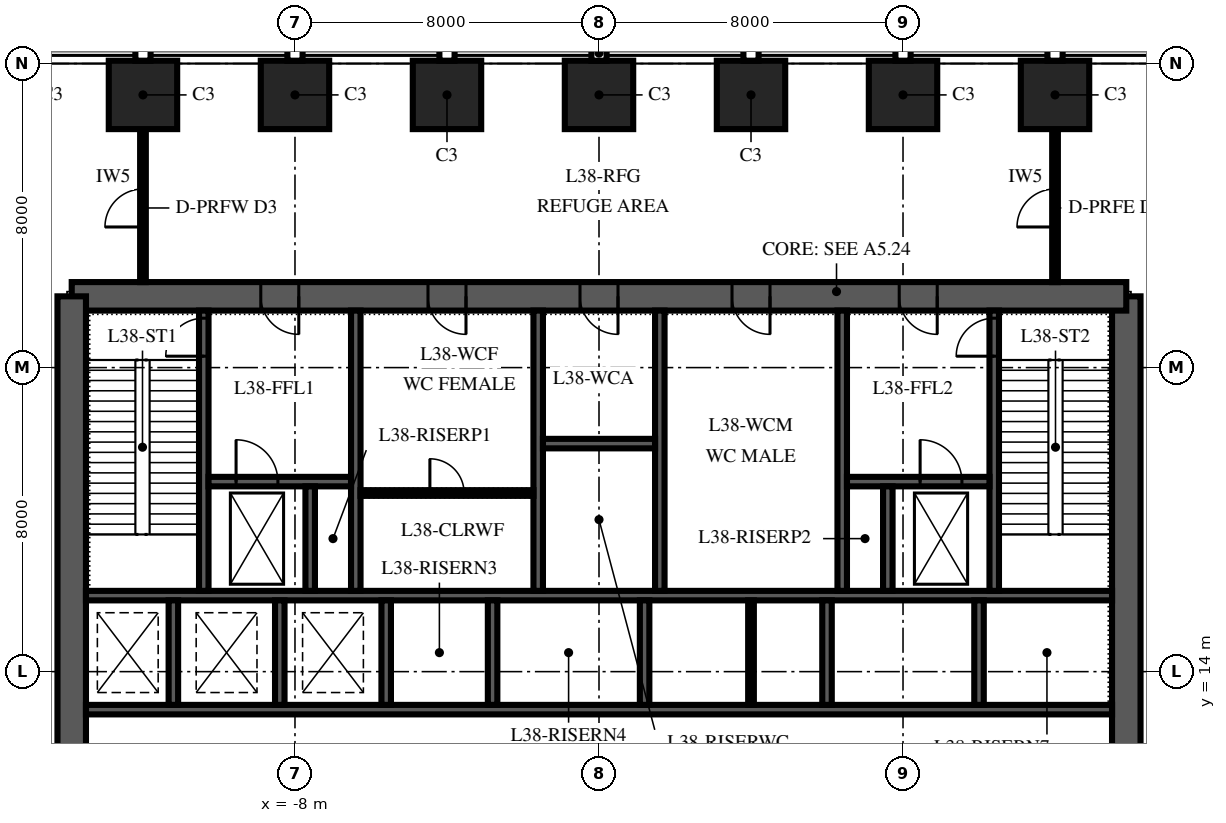
"""IFC4 building model, lengths in metres.
Left out: names, types, materials, properties, quantities, classifications, styles, units other than length and angle.
Written with IfcOpenShell. Run it as: python <this file> out.ifc"""

import sys

from ifc_helpers import new_model, si_unit, direction, frame, frame_2d, origin, origin_2d, place, context, subcontext, project, spatial, polyline, rectangle, outline, extrude, element, fill, save


model = new_model("IFC4")
c1 = context("Model", 3, precision=1e-05, world=origin(), true_north=direction((0.0, 1.0)))
c2 = subcontext(c1, "Body", "Model", "MODEL_VIEW")
j1 = project(units=[si_unit("LENGTHUNIT", "METRE"), si_unit("PLANEANGLEUNIT", "RADIAN")], contexts=[c1])
p1 = place(None, origin())
s1 = spatial("IfcSite", under=j1, at=p1, CompositionType="ELEMENT")
p2 = place(p1, origin())
s2 = spatial("IfcBuilding", under=s1, at=p2, CompositionType="ELEMENT")
p3 = place(p2, frame((0.0, 0.0, 167.0)))
s3 = spatial("IfcBuildingStorey", under=s2, at=p3, CompositionType="ELEMENT", Elevation=167.0)
for number, where, z_axis, x_axis in (
    (1, (12.0, 29.175, 0.0), (0.0, 0.0, 1.0), (-1.0, 0.0, 0.0)),
    (2, (8.0, 29.175, 0.0), (0.0, 0.0, 1.0), (-1.0, 0.0, 0.0)),
    (3, (4.0, 29.175, 0.0), (0.0, 0.0, 1.0), (-1.0, 0.0, 0.0)),
    (4, (0.0, 29.175, 0.0), (0.0, 0.0, 1.0), (-1.0, 0.0, 0.0)),
    (5, (-4.0, 29.175, 0.0), (0.0, 0.0, 1.0), (-1.0, 0.0, 0.0)),
    (6, (-8.0, 29.175, 0.0), (0.0, 0.0, 1.0), (-1.0, 0.0, 0.0)),
    (7, (-12.0, 29.175, 0.0), (0.0, 0.0, 1.0), (-1.0, 0.0, 0.0)),
):
    element("IfcColumn", number, at=place(p3, frame(where, z_axis=z_axis, x_axis=x_axis)), inside=s3, PredefinedType="COLUMN", context=c2, shape_type="SweptSolid", body=[
        extrude(rectangle(XDim=1.8, YDim=1.8, at=origin_2d()), origin(), (0.0, 0.0, 1.0), 6.0),
    ])
p4 = place(p3, frame((13.875, 6.125, 0.0), z_axis=(0.0, 0.0, 1.0), x_axis=(0.0, 1.0, 0.0)))
e8 = element("IfcWall", 8, at=p4, inside=s3, PredefinedType="SHEAR", context=c2, shape_type="SweptSolid", body=[
    extrude(outline(polyline([(0.0, -0.375), (17.75, -0.375), (17.75, 0.0), (17.375, 0.0), (17.375, 0.375), (0.375, 0.375), (0.375, 0.0), (0.0, 0.0), (0.0, -0.375)])), origin(), (0.0, 0.0, 1.0), 6.0),
])
p5 = place(p3, frame((13.875, 23.875, 0.0), z_axis=(0.0, 0.0, 1.0), x_axis=(-1.0, 0.0, 0.0)))
e9 = element("IfcWall", 9, at=p5, inside=s3, PredefinedType="SHEAR", context=c2, shape_type="SweptSolid", body=[
    extrude(rectangle(XDim=27.75, YDim=0.75, at=frame_2d((13.875, 0.0))), origin(), (0.0, 0.0, 1.0), 6.0),
])
p6 = place(p5, frame((21.775, 0.0, 0.0)))
e10 = element("IfcOpeningElement", 10, at=p6, cuts=e9, PredefinedType="OPENING", context=c2, shape_type="SweptSolid", body=[
    extrude(rectangle(XDim=1.0, YDim=2.1, at=frame_2d((0.5, 1.05))), frame((0.0, 0.39, 0.0), z_axis=(0.0, -1.0, 0.0), x_axis=(1.0, 0.0, 0.0)), (0.0, 0.0, 1.0), 0.78),
])
p7 = place(p5, frame((4.975, 0.0, 0.0)))
e11 = element("IfcOpeningElement", 11, at=p7, cuts=e9, PredefinedType="OPENING", context=c2, shape_type="SweptSolid", body=[
    extrude(rectangle(XDim=1.0, YDim=2.1, at=frame_2d((0.5, 1.05))), frame((0.0, 0.39, 0.0), z_axis=(0.0, -1.0, 0.0), x_axis=(1.0, 0.0, 0.0)), (0.0, 0.0, 1.0), 0.78),
])
p8 = place(p5, frame((17.375, 0.0, 0.0)))
e12 = element("IfcOpeningElement", 12, at=p8, cuts=e9, PredefinedType="OPENING", context=c2, shape_type="SweptSolid", body=[
    extrude(rectangle(XDim=1.0, YDim=2.1, at=frame_2d((0.5, 1.05))), frame((0.0, 0.39, 0.0), z_axis=(0.0, -1.0, 0.0), x_axis=(1.0, 0.0, 0.0)), (0.0, 0.0, 1.0), 0.78),
])
p9 = place(p5, frame((13.375, 0.0, 0.0)))
e13 = element("IfcOpeningElement", 13, at=p9, cuts=e9, PredefinedType="OPENING", context=c2, shape_type="SweptSolid", body=[
    extrude(rectangle(XDim=1.0, YDim=2.1, at=frame_2d((0.5, 1.05))), frame((0.0, 0.39, 0.0), z_axis=(0.0, -1.0, 0.0), x_axis=(1.0, 0.0, 0.0)), (0.0, 0.0, 1.0), 0.78),
])
p10 = place(p5, frame((9.375, 0.0, 0.0)))
e14 = element("IfcOpeningElement", 14, at=p10, cuts=e9, PredefinedType="OPENING", context=c2, shape_type="SweptSolid", body=[
    extrude(rectangle(XDim=1.0, YDim=2.1, at=frame_2d((0.5, 1.05))), frame((0.0, 0.39, 0.0), z_axis=(0.0, -1.0, 0.0), x_axis=(1.0, 0.0, 0.0)), (0.0, 0.0, 1.0), 0.78),
])
p11 = place(p3, frame((-13.875, 23.875, 0.0), z_axis=(0.0, 0.0, 1.0), x_axis=(0.0, -1.0, 0.0)))
e15 = element("IfcWall", 15, at=p11, inside=s3, PredefinedType="SHEAR", context=c2, shape_type="SweptSolid", body=[
    extrude(outline(polyline([(0.0, -0.375), (17.75, -0.375), (17.75, 0.0), (17.375, 0.0), (17.375, 0.375), (0.375, 0.375), (0.375, 0.0), (0.0, 0.0), (0.0, -0.375)])), origin(), (0.0, 0.0, 1.0), 6.0),
])
for number, where, z_axis, x_axis in (
    (16, (-13.5, 13.0, 0.0), (0.0, 0.0, 1.0), (1.0, 0.0, 0.0)),
    (17, (-13.5, 16.0, 0.0), (0.0, 0.0, 1.0), (1.0, 0.0, 0.0)),
):
    element("IfcWall", number, at=place(p3, frame(where, z_axis=z_axis, x_axis=x_axis)), inside=s3, PredefinedType="SHEAR", context=c2, shape_type="SweptSolid", body=[
        extrude(rectangle(XDim=27.0, YDim=0.25, at=frame_2d((13.5, 0.0))), origin(), (0.0, 0.0, 1.0), 6.0),
    ])
for number, where, z_axis, x_axis in (
    (18, (-11.2, 13.125, 0.0), (0.0, 0.0, 1.0), (0.0, 1.0, 0.0)),
    (19, (-8.4, 13.125, 0.0), (0.0, 0.0, 1.0), (0.0, 1.0, 0.0)),
    (20, (-5.6, 13.125, 0.0), (0.0, 0.0, 1.0), (0.0, 1.0, 0.0)),
    (21, (-2.8, 13.125, 0.0), (0.0, 0.0, 1.0), (0.0, 1.0, 0.0)),
    (22, (1.2, 13.125, 0.0), (0.0, 0.0, 1.0), (0.0, 1.0, 0.0)),
    (23, (6.0, 13.125, 0.0), (0.0, 0.0, 1.0), (0.0, 1.0, 0.0)),
    (24, (10.0, 13.125, 0.0), (0.0, 0.0, 1.0), (0.0, 1.0, 0.0)),
):
    element("IfcWall", number, at=place(p3, frame(where, z_axis=z_axis, x_axis=x_axis)), inside=s3, PredefinedType="SHEAR", context=c2, shape_type="SweptSolid", body=[
        extrude(rectangle(XDim=2.75, YDim=0.25, at=frame_2d((1.375, 0.0))), origin(), (0.0, 0.0, 1.0), 6.0),
    ])
p12 = place(p3, frame((-10.4, 16.125, 0.0), z_axis=(0.0, 0.0, 1.0), x_axis=(0.0, 1.0, 0.0)))
e25 = element("IfcWall", 25, at=p12, inside=s3, PredefinedType="SHEAR", context=c2, shape_type="SweptSolid", body=[
    extrude(rectangle(XDim=7.375, YDim=0.25, at=frame_2d((3.688, 0.0))), origin(), (0.0, 0.0, 1.0), 6.0),
])
p13 = place(p12, frame((6.175, 0.0, 0.0)))
e26 = element("IfcOpeningElement", 26, at=p13, cuts=e25, PredefinedType="OPENING", context=c2, shape_type="SweptSolid", body=[
    extrude(rectangle(XDim=1.0, YDim=2.1, at=frame_2d((0.5, 1.05))), frame((0.0, 0.14, 0.0), z_axis=(0.0, -1.0, 0.0), x_axis=(1.0, 0.0, 0.0)), (0.0, 0.0, 1.0), 0.28),
])
for number, where, z_axis, x_axis in (
    (27, (-6.4, 16.125, 0.0), (0.0, 0.0, 1.0), (0.0, 1.0, 0.0)),
    (28, (-1.6, 16.125, 0.0), (0.0, 0.0, 1.0), (0.0, 1.0, 0.0)),
    (29, (1.6, 16.125, 0.0), (0.0, 0.0, 1.0), (0.0, 1.0, 0.0)),
    (30, (6.4, 16.125, 0.0), (0.0, 0.0, 1.0), (0.0, 1.0, 0.0)),
):
    element("IfcWall", number, at=place(p3, frame(where, z_axis=z_axis, x_axis=x_axis)), inside=s3, PredefinedType="SHEAR", context=c2, shape_type="SweptSolid", body=[
        extrude(rectangle(XDim=7.375, YDim=0.25, at=frame_2d((3.688, 0.0))), origin(), (0.0, 0.0, 1.0), 6.0),
    ])
p14 = place(p3, frame((10.4, 16.125, 0.0), z_axis=(0.0, 0.0, 1.0), x_axis=(0.0, 1.0, 0.0)))
e31 = element("IfcWall", 31, at=p14, inside=s3, PredefinedType="SHEAR", context=c2, shape_type="SweptSolid", body=[
    extrude(rectangle(XDim=7.375, YDim=0.25, at=frame_2d((3.688, 0.0))), origin(), (0.0, 0.0, 1.0), 6.0),
])
p15 = place(p14, frame((6.175, 0.0, 0.0)))
e32 = element("IfcOpeningElement", 32, at=p15, cuts=e31, PredefinedType="OPENING", context=c2, shape_type="SweptSolid", body=[
    extrude(rectangle(XDim=1.0, YDim=2.1, at=frame_2d((0.5, 1.05))), frame((0.0, 0.14, 0.0), z_axis=(0.0, -1.0, 0.0), x_axis=(1.0, 0.0, 0.0)), (0.0, 0.0, 1.0), 0.28),
])
p16 = place(p3, frame((-10.275, 19.0, 0.0), z_axis=(0.0, 0.0, 1.0), x_axis=(1.0, 0.0, 0.0)))
e33 = element("IfcWall", 33, at=p16, inside=s3, PredefinedType="SHEAR", context=c2, shape_type="SweptSolid", body=[
    extrude(rectangle(XDim=3.75, YDim=0.25, at=frame_2d((1.875, 0.0))), origin(), (0.0, 0.0, 1.0), 6.0),
])
p17 = place(p16, frame((0.725, 0.0, 0.0)))
e34 = element("IfcOpeningElement", 34, at=p17, cuts=e33, PredefinedType="OPENING", context=c2, shape_type="SweptSolid", body=[
    extrude(rectangle(XDim=1.1, YDim=2.1, at=frame_2d((0.55, 1.05))), frame((0.0, 0.14, 0.0), z_axis=(0.0, -1.0, 0.0), x_axis=(1.0, 0.0, 0.0)), (0.0, 0.0, 1.0), 0.28),
])
p18 = place(p3, frame((6.525, 19.0, 0.0), z_axis=(0.0, 0.0, 1.0), x_axis=(1.0, 0.0, 0.0)))
e35 = element("IfcWall", 35, at=p18, inside=s3, PredefinedType="SHEAR", context=c2, shape_type="SweptSolid", body=[
    extrude(rectangle(XDim=3.75, YDim=0.25, at=frame_2d((1.875, 0.0))), origin(), (0.0, 0.0, 1.0), 6.0),
])
p19 = place(p18, frame((1.925, 0.0, 0.0)))
e36 = element("IfcOpeningElement", 36, at=p19, cuts=e35, PredefinedType="OPENING", context=c2, shape_type="SweptSolid", body=[
    extrude(rectangle(XDim=1.1, YDim=2.1, at=frame_2d((0.55, 1.05))), frame((0.0, 0.14, 0.0), z_axis=(0.0, -1.0, 0.0), x_axis=(1.0, 0.0, 0.0)), (0.0, 0.0, 1.0), 0.28),
])
for number, where, z_axis, x_axis in (
    (37, (-7.6, 16.125, 0.0), (0.0, 0.0, 1.0), (0.0, 1.0, 0.0)),
    (38, (7.6, 16.125, 0.0), (0.0, 0.0, 1.0), (0.0, 1.0, 0.0)),
):
    element("IfcWall", number, at=place(p3, frame(where, z_axis=z_axis, x_axis=x_axis)), inside=s3, PredefinedType="SHEAR", context=c2, shape_type="SweptSolid", body=[
        extrude(rectangle(XDim=2.75, YDim=0.25, at=frame_2d((1.375, 0.0))), origin(), (0.0, 0.0, 1.0), 6.0),
    ])
p20 = place(p3, frame((-1.475, 20.0, 0.0), z_axis=(0.0, 0.0, 1.0), x_axis=(1.0, 0.0, 0.0)))
e39 = element("IfcWall", 39, at=p20, inside=s3, PredefinedType="SHEAR", context=c2, shape_type="SweptSolid", body=[
    extrude(rectangle(XDim=2.95, YDim=0.25, at=frame_2d((1.475, 0.0))), origin(), (0.0, 0.0, 1.0), 6.0),
])
p21 = place(p3, frame((-6.275, 18.7, 0.0), z_axis=(0.0, 0.0, 1.0), x_axis=(1.0, 0.0, 0.0)))
e40 = element("IfcWall", 40, at=p21, inside=s3, PredefinedType="PARTITIONING", context=c2, shape_type="SweptSolid", body=[
    extrude(rectangle(XDim=4.55, YDim=0.15, at=frame_2d((2.275, 0.0))), origin(), (0.0, 0.0, 1.0), 5.85),
])
p22 = place(p21, frame((1.825, 0.0, 0.0)))
e41 = element("IfcOpeningElement", 41, at=p22, cuts=e40, PredefinedType="OPENING", context=c2, shape_type="SweptSolid", body=[
    extrude(rectangle(XDim=0.9, YDim=2.1, at=frame_2d((0.45, 1.05))), frame((0.0, 0.09, 0.0), z_axis=(0.0, -1.0, 0.0), x_axis=(1.0, 0.0, 0.0)), (0.0, 0.0, 1.0), 0.18),
])
p23 = place(p3, frame((4.0, 13.125, 0.0), z_axis=(0.0, 0.0, 1.0), x_axis=(0.0, 1.0, 0.0)))
e42 = element("IfcWall", 42, at=p23, inside=s3, PredefinedType="PARTITIONING", context=c2, shape_type="SweptSolid", body=[
    extrude(rectangle(XDim=2.75, YDim=0.15, at=frame_2d((1.375, 0.0))), origin(), (0.0, 0.0, 1.0), 5.85),
])
p24 = place(p3, frame((12.0, 24.25, 0.0), z_axis=(0.0, 0.0, 1.0), x_axis=(0.0, 1.0, 0.0)))
e43 = element("IfcWall", 43, at=p24, inside=s3, PredefinedType="PARTITIONING", context=c2, shape_type="SweptSolid", body=[
    extrude(rectangle(XDim=3.97, YDim=0.15, at=frame_2d((1.985, 0.0))), origin(), (0.0, 0.0, 1.0), 5.8),
])
p25 = place(p24, frame((1.45, 0.0, 0.0)))
e44 = element("IfcOpeningElement", 44, at=p25, cuts=e43, PredefinedType="OPENING", context=c2, shape_type="SweptSolid", body=[
    extrude(rectangle(XDim=1.0, YDim=2.1, at=frame_2d((0.5, 1.05))), frame((0.0, 0.09, 0.0), z_axis=(0.0, -1.0, 0.0), x_axis=(1.0, 0.0, 0.0)), (0.0, 0.0, 1.0), 0.18),
])
p26 = place(p3, frame((-12.0, 24.25, 0.0), z_axis=(0.0, 0.0, 1.0), x_axis=(0.0, 1.0, 0.0)))
e45 = element("IfcWall", 45, at=p26, inside=s3, PredefinedType="PARTITIONING", context=c2, shape_type="SweptSolid", body=[
    extrude(rectangle(XDim=3.97, YDim=0.15, at=frame_2d((1.985, 0.0))), origin(), (0.0, 0.0, 1.0), 5.8),
])
p27 = place(p26, frame((1.45, 0.0, 0.0)))
e46 = element("IfcOpeningElement", 46, at=p27, cuts=e45, PredefinedType="OPENING", context=c2, shape_type="SweptSolid", body=[
    extrude(rectangle(XDim=1.0, YDim=2.1, at=frame_2d((0.5, 1.05))), frame((0.0, 0.09, 0.0), z_axis=(0.0, -1.0, 0.0), x_axis=(1.0, 0.0, 0.0)), (0.0, 0.0, 1.0), 0.18),
])
p28 = place(p6, origin())
e47 = element("IfcDoor", 47, at=p28, inside=s3, OperationType="SINGLE_SWING_RIGHT", PredefinedType="DOOR", context=c2, shape_type="SweptSolid", body=[
    extrude(rectangle(XDim=1.0, YDim=2.1, at=frame_2d((0.5, 1.05))), frame((0.0, 0.375, 0.0), z_axis=(0.0, -1.0, 0.0), x_axis=(1.0, 0.0, 0.0)), (0.0, 0.0, 1.0), 0.75),
])
fill(e10, e47)
p29 = place(p7, origin())
e48 = element("IfcDoor", 48, at=p29, inside=s3, OperationType="SINGLE_SWING_RIGHT", PredefinedType="DOOR", context=c2, shape_type="SweptSolid", body=[
    extrude(rectangle(XDim=1.0, YDim=2.1, at=frame_2d((0.5, 1.05))), frame((0.0, 0.375, 0.0), z_axis=(0.0, -1.0, 0.0), x_axis=(1.0, 0.0, 0.0)), (0.0, 0.0, 1.0), 0.75),
])
fill(e11, e48)
p30 = place(p8, origin())
e49 = element("IfcDoor", 49, at=p30, inside=s3, OperationType="SINGLE_SWING_LEFT", PredefinedType="DOOR", context=c2, shape_type="SweptSolid", body=[
    extrude(rectangle(XDim=1.0, YDim=2.1, at=frame_2d((0.5, 1.05))), frame((0.0, 0.375, 0.0), z_axis=(0.0, -1.0, 0.0), x_axis=(1.0, 0.0, 0.0)), (0.0, 0.0, 1.0), 0.75),
])
fill(e12, e49)
p31 = place(p9, origin())
e50 = element("IfcDoor", 50, at=p31, inside=s3, OperationType="SINGLE_SWING_LEFT", PredefinedType="DOOR", context=c2, shape_type="SweptSolid", body=[
    extrude(rectangle(XDim=1.0, YDim=2.1, at=frame_2d((0.5, 1.05))), frame((0.0, 0.375, 0.0), z_axis=(0.0, -1.0, 0.0), x_axis=(1.0, 0.0, 0.0)), (0.0, 0.0, 1.0), 0.75),
])
fill(e13, e50)
p32 = place(p10, origin())
e51 = element("IfcDoor", 51, at=p32, inside=s3, OperationType="SINGLE_SWING_LEFT", PredefinedType="DOOR", context=c2, shape_type="SweptSolid", body=[
    extrude(rectangle(XDim=1.0, YDim=2.1, at=frame_2d((0.5, 1.05))), frame((0.0, 0.375, 0.0), z_axis=(0.0, -1.0, 0.0), x_axis=(1.0, 0.0, 0.0)), (0.0, 0.0, 1.0), 0.75),
])
fill(e14, e51)
p33 = place(p13, origin())
e52 = element("IfcDoor", 52, at=p33, inside=s3, OperationType="SINGLE_SWING_LEFT", PredefinedType="DOOR", context=c2, shape_type="SweptSolid", body=[
    extrude(rectangle(XDim=1.0, YDim=2.1, at=frame_2d((0.5, 1.05))), frame((0.0, 0.125, 0.0), z_axis=(0.0, -1.0, 0.0), x_axis=(1.0, 0.0, 0.0)), (0.0, 0.0, 1.0), 0.25),
])
fill(e26, e52)
p34 = place(p15, origin())
e53 = element("IfcDoor", 53, at=p34, inside=s3, OperationType="SINGLE_SWING_LEFT", PredefinedType="DOOR", context=c2, shape_type="SweptSolid", body=[
    extrude(rectangle(XDim=1.0, YDim=2.1, at=frame_2d((0.5, 1.05))), frame((0.0, 0.125, 0.0), z_axis=(0.0, -1.0, 0.0), x_axis=(1.0, 0.0, 0.0)), (0.0, 0.0, 1.0), 0.25),
])
fill(e32, e53)
p35 = place(p19, origin())
e54 = element("IfcDoor", 54, at=p35, inside=s3, OperationType="SLIDING_TO_RIGHT", PredefinedType="DOOR", context=c2, shape_type="SweptSolid", body=[
    extrude(rectangle(XDim=1.1, YDim=2.1, at=frame_2d((0.55, 1.05))), frame((0.0, 0.125, 0.0), z_axis=(0.0, -1.0, 0.0), x_axis=(1.0, 0.0, 0.0)), (0.0, 0.0, 1.0), 0.25),
])
fill(e36, e54)
p36 = place(p17, origin())
e55 = element("IfcDoor", 55, at=p36, inside=s3, OperationType="SLIDING_TO_RIGHT", PredefinedType="DOOR", context=c2, shape_type="SweptSolid", body=[
    extrude(rectangle(XDim=1.1, YDim=2.1, at=frame_2d((0.55, 1.05))), frame((0.0, 0.125, 0.0), z_axis=(0.0, -1.0, 0.0), x_axis=(1.0, 0.0, 0.0)), (0.0, 0.0, 1.0), 0.25),
])
fill(e34, e55)
p37 = place(p22, origin())
e56 = element("IfcDoor", 56, at=p37, inside=s3, OperationType="SINGLE_SWING_LEFT", PredefinedType="DOOR", context=c2, shape_type="SweptSolid", body=[
    extrude(rectangle(XDim=0.9, YDim=2.1, at=frame_2d((0.45, 1.05))), frame((0.0, 0.075, 0.0), z_axis=(0.0, -1.0, 0.0), x_axis=(1.0, 0.0, 0.0)), (0.0, 0.0, 1.0), 0.149),
])
fill(e41, e56)
p38 = place(p25, origin())
e57 = element("IfcDoor", 57, at=p38, inside=s3, OperationType="SINGLE_SWING_RIGHT", PredefinedType="DOOR", context=c2, shape_type="SweptSolid", body=[
    extrude(rectangle(XDim=1.0, YDim=2.1, at=frame_2d((0.5, 1.05))), frame((0.0, 0.075, 0.0), z_axis=(0.0, -1.0, 0.0), x_axis=(1.0, 0.0, 0.0)), (0.0, 0.0, 1.0), 0.149),
])
fill(e44, e57)
p39 = place(p27, origin())
e58 = element("IfcDoor", 58, at=p39, inside=s3, OperationType="SINGLE_SWING_RIGHT", PredefinedType="DOOR", context=c2, shape_type="SweptSolid", body=[
    extrude(rectangle(XDim=1.0, YDim=2.1, at=frame_2d((0.5, 1.05))), frame((0.0, 0.075, 0.0), z_axis=(0.0, -1.0, 0.0), x_axis=(1.0, 0.0, 0.0)), (0.0, 0.0, 1.0), 0.149),
])
fill(e46, e58)
save(model, sys.argv[1])
